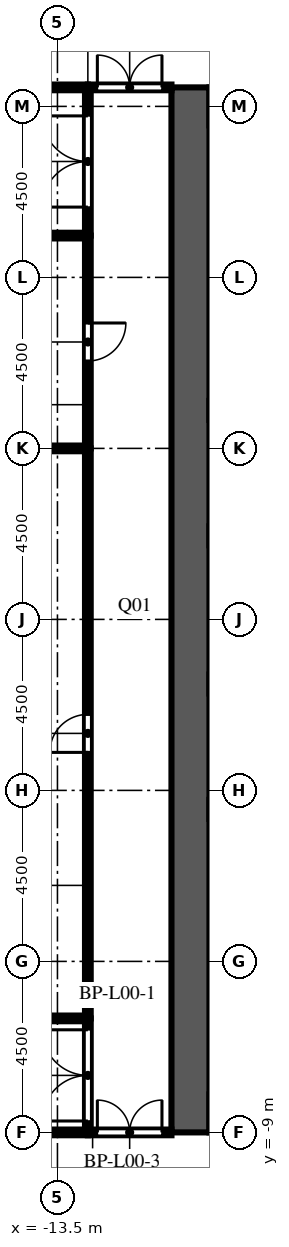
"""IFC4 building model, lengths in metres.
Left out: names, types, materials, properties, quantities, classifications, styles, units other than length and angle.
Written with IfcOpenShell. Run it as: python <this file> out.ifc"""

import sys

from ifc_helpers import new_model, si_unit, direction, frame, frame_2d, origin, place, context, subcontext, project, spatial, rectangle, extrude, element, fill, save


model = new_model("IFC4")
c1 = context("Model", 3, precision=1e-05, world=origin(), true_north=direction((0.0, 1.0)))
c2 = subcontext(c1, "Body", "Model", "MODEL_VIEW")
j1 = project(units=[si_unit("LENGTHUNIT", "METRE"), si_unit("PLANEANGLEUNIT", "RADIAN")], contexts=[c1])
p1 = place(None, origin())
s1 = spatial("IfcSite", under=j1, at=p1, CompositionType="ELEMENT")
p2 = place(p1, origin())
s2 = spatial("IfcBuilding", under=s1, at=p2, CompositionType="ELEMENT")
p3 = place(p2, origin())
s3 = spatial("IfcBuildingStorey", under=s2, at=p3, CompositionType="ELEMENT", Elevation=0.0)
p4 = place(p3, frame((-10.0, -9.0, 0.0), z_axis=(0.0, 0.0, 1.0), x_axis=(0.0, 1.0, 0.0)))
e1 = element("IfcWall", 1, at=p4, inside=s3, PredefinedType="SHEAR", context=c2, shape_type="SweptSolid", body=[
    extrude(rectangle(XDim=27.5, YDim=1.0, at=frame_2d((13.75, 0.0))), origin(), (0.0, 0.0, 1.0), 7.2),
])
p5 = place(p4, frame((12.55, 0.0, 0.0)))
e2 = element("IfcOpeningElement", 2, at=p5, cuts=e1, PredefinedType="OPENING", context=c2, shape_type="SweptSolid", body=[
    extrude(rectangle(XDim=2.4, YDim=2.4, at=frame_2d((1.2, 1.2))), frame((0.0, 0.51, 0.0), z_axis=(0.0, -1.0, 0.0), x_axis=(1.0, 0.0, 0.0)), (0.0, 0.0, 1.0), 1.02),
])
p6 = place(p4, frame((6.825, 0.0, 0.0)))
e3 = element("IfcOpeningElement", 3, at=p6, cuts=e1, PredefinedType="OPENING", context=c2, shape_type="SweptSolid", body=[
    extrude(rectangle(XDim=1.2, YDim=2.1, at=frame_2d((0.6, 1.05))), frame((0.0, 0.51, 0.0), z_axis=(0.0, -1.0, 0.0), x_axis=(1.0, 0.0, 0.0)), (0.0, 0.0, 1.0), 1.02),
])
p7 = place(p4, frame((19.475, 0.0, 0.0)))
e4 = element("IfcOpeningElement", 4, at=p7, cuts=e1, PredefinedType="OPENING", context=c2, shape_type="SweptSolid", body=[
    extrude(rectangle(XDim=1.2, YDim=2.1, at=frame_2d((0.6, 1.05))), frame((0.0, 0.51, 0.0), z_axis=(0.0, -1.0, 0.0), x_axis=(1.0, 0.0, 0.0)), (0.0, 0.0, 1.0), 1.02),
])
p8 = place(p3, frame((-12.7, -9.0, 0.0), z_axis=(0.0, 0.0, 1.0), x_axis=(1.0, 0.0, 0.0)))
e5 = element("IfcWall", 5, at=p8, inside=s3, PredefinedType="PARTITIONING", context=c2, shape_type="SweptSolid", body=[
    extrude(rectangle(XDim=2.2, YDim=0.15, at=frame_2d((1.1, 0.0))), origin(), (0.0, 0.0, 1.0), 6.75),
])
p9 = place(p8, frame((0.25, 0.0, 0.0)))
e6 = element("IfcOpeningElement", 6, at=p9, cuts=e5, PredefinedType="OPENING", context=c2, shape_type="SweptSolid", body=[
    extrude(rectangle(XDim=1.7, YDim=2.1, at=frame_2d((0.85, 1.05))), frame((0.0, 0.085, 0.0), z_axis=(0.0, -1.0, 0.0), x_axis=(1.0, 0.0, 0.0)), (0.0, 0.0, 1.0), 0.17),
])
p10 = place(p3, frame((-17.15, -9.0, 0.0), z_axis=(0.0, 0.0, 1.0), x_axis=(1.0, 0.0, 0.0)))
e7 = element("IfcWall", 7, at=p10, inside=s3, PredefinedType="PARTITIONING", context=c2, shape_type="SweptSolid", body=[
    extrude(rectangle(XDim=4.45, YDim=0.15, at=frame_2d((2.225, 0.0))), origin(), (0.0, 0.0, 1.0), 6.75),
])
p11 = place(p3, frame((-12.7, -9.0, 0.0), z_axis=(0.0, 0.0, 1.0), x_axis=(0.0, 1.0, 0.0)))
e8 = element("IfcWall", 8, at=p11, inside=s3, PredefinedType="PARTITIONING", context=c2, shape_type="SweptSolid", body=[
    extrude(rectangle(XDim=3.0, YDim=0.15, at=frame_2d((1.5, 0.0))), origin(), (0.0, 0.0, 1.0), 6.75),
])
p12 = place(p11, frame((0.3, 0.0, 0.0)))
e9 = element("IfcOpeningElement", 9, at=p12, cuts=e8, PredefinedType="OPENING", context=c2, shape_type="SweptSolid", body=[
    extrude(rectangle(XDim=2.4, YDim=2.4, at=frame_2d((1.2, 1.2))), frame((0.0, 0.085, 0.0), z_axis=(0.0, -1.0, 0.0), x_axis=(1.0, 0.0, 0.0)), (0.0, 0.0, 1.0), 0.17),
])
p13 = place(p3, frame((-12.7, -6.0, 0.0), z_axis=(0.0, 0.0, 1.0), x_axis=(0.0, 1.0, 0.0)))
e10 = element("IfcWall", 10, at=p13, inside=s3, PredefinedType="PARTITIONING", context=c2, shape_type="SweptSolid", body=[
    extrude(rectangle(XDim=15.0, YDim=0.15, at=frame_2d((7.5, 0.0))), origin(), (0.0, 0.0, 1.0), 6.75),
])
p14 = place(p13, frame((7.0, 0.0, 0.0)))
e11 = element("IfcOpeningElement", 11, at=p14, cuts=e10, PredefinedType="OPENING", context=c2, shape_type="SweptSolid", body=[
    extrude(rectangle(XDim=1.0, YDim=2.1, at=frame_2d((0.5, 1.05))), frame((0.0, 0.085, 0.0), z_axis=(0.0, -1.0, 0.0), x_axis=(1.0, 0.0, 0.0)), (0.0, 0.0, 1.0), 0.17),
])
p15 = place(p3, frame((-12.7, 9.0, 0.0), z_axis=(0.0, 0.0, 1.0), x_axis=(0.0, 1.0, 0.0)))
e12 = element("IfcWall", 12, at=p15, inside=s3, PredefinedType="PARTITIONING", context=c2, shape_type="SweptSolid", body=[
    extrude(rectangle(XDim=5.6, YDim=0.15, at=frame_2d((2.8, 0.0))), origin(), (0.0, 0.0, 1.0), 6.75),
])
p16 = place(p15, frame((2.3, 0.0, 0.0)))
e13 = element("IfcOpeningElement", 13, at=p16, cuts=e12, PredefinedType="OPENING", context=c2, shape_type="SweptSolid", body=[
    extrude(rectangle(XDim=1.0, YDim=2.1, at=frame_2d((0.5, 1.05))), frame((0.0, 0.085, 0.0), z_axis=(0.0, -1.0, 0.0), x_axis=(1.0, 0.0, 0.0)), (0.0, 0.0, 1.0), 0.17),
])
p17 = place(p3, frame((-12.7, 14.6, 0.0), z_axis=(0.0, 0.0, 1.0), x_axis=(0.0, 1.0, 0.0)))
e14 = element("IfcWall", 14, at=p17, inside=s3, PredefinedType="PARTITIONING", context=c2, shape_type="SweptSolid", body=[
    extrude(rectangle(XDim=3.9, YDim=0.15, at=frame_2d((1.95, 0.0))), origin(), (0.0, 0.0, 1.0), 6.75),
])
p18 = place(p17, frame((0.75, 0.0, 0.0)))
e15 = element("IfcOpeningElement", 15, at=p18, cuts=e14, PredefinedType="OPENING", context=c2, shape_type="SweptSolid", body=[
    extrude(rectangle(XDim=2.4, YDim=2.4, at=frame_2d((1.2, 1.2))), frame((0.0, 0.085, 0.0), z_axis=(0.0, -1.0, 0.0), x_axis=(1.0, 0.0, 0.0)), (0.0, 0.0, 1.0), 0.17),
])
p19 = place(p3, frame((-12.7, 18.5, 0.0), z_axis=(0.0, 0.0, 1.0), x_axis=(1.0, 0.0, 0.0)))
e16 = element("IfcWall", 16, at=p19, inside=s3, PredefinedType="PARTITIONING", context=c2, shape_type="SweptSolid", body=[
    extrude(rectangle(XDim=2.2, YDim=0.15, at=frame_2d((1.1, 0.0))), origin(), (0.0, 0.0, 1.0), 6.75),
])
p20 = place(p19, frame((0.25, 0.0, 0.0)))
e17 = element("IfcOpeningElement", 17, at=p20, cuts=e16, PredefinedType="OPENING", context=c2, shape_type="SweptSolid", body=[
    extrude(rectangle(XDim=1.7, YDim=2.1, at=frame_2d((0.85, 1.05))), frame((0.0, 0.085, 0.0), z_axis=(0.0, -1.0, 0.0), x_axis=(1.0, 0.0, 0.0)), (0.0, 0.0, 1.0), 0.17),
])
p21 = place(p3, frame((-31.325, -6.0, 0.0), z_axis=(0.0, 0.0, 1.0), x_axis=(1.0, 0.0, 0.0)))
e18 = element("IfcWall", 18, at=p21, inside=s3, PredefinedType="PARTITIONING", context=c2, shape_type="SweptSolid", body=[
    extrude(rectangle(XDim=18.625, YDim=0.15, at=frame_2d((9.312, 0.0))), origin(), (0.0, 0.0, 1.0), 6.75),
])
p22 = place(p3, frame((-17.15, 9.0, 0.0), z_axis=(0.0, 0.0, 1.0), x_axis=(1.0, 0.0, 0.0)))
e19 = element("IfcWall", 19, at=p22, inside=s3, PredefinedType="PARTITIONING", context=c2, shape_type="SweptSolid", body=[
    extrude(rectangle(XDim=4.45, YDim=0.15, at=frame_2d((2.225, 0.0))), origin(), (0.0, 0.0, 1.0), 6.75),
])
p23 = place(p3, frame((-31.325, 14.6, 0.0), z_axis=(0.0, 0.0, 1.0), x_axis=(1.0, 0.0, 0.0)))
e20 = element("IfcWall", 20, at=p23, inside=s3, PredefinedType="PARTITIONING", context=c2, shape_type="SweptSolid", body=[
    extrude(rectangle(XDim=18.625, YDim=0.15, at=frame_2d((9.312, 0.0))), origin(), (0.0, 0.0, 1.0), 6.75),
])
p24 = place(p3, frame((-17.15, 18.5, 0.0), z_axis=(0.0, 0.0, 1.0), x_axis=(1.0, 0.0, 0.0)))
e21 = element("IfcWall", 21, at=p24, inside=s3, PredefinedType="PARTITIONING", context=c2, shape_type="SweptSolid", body=[
    extrude(rectangle(XDim=4.45, YDim=0.15, at=frame_2d((2.225, 0.0))), origin(), (0.0, 0.0, 1.0), 6.75),
])
p25 = place(p5, origin())
e22 = element("IfcDoor", 22, at=p25, inside=s3, OperationType="DOUBLE_DOOR_DOUBLE_SWING", PredefinedType="DOOR", context=c2, shape_type="SweptSolid", body=[
    extrude(rectangle(XDim=2.4, YDim=2.4, at=frame_2d((1.2, 1.2))), frame((0.0, 0.025, 0.0), z_axis=(0.0, -1.0, 0.0), x_axis=(1.0, 0.0, 0.0)), (0.0, 0.0, 1.0), 0.05),
])
fill(e2, e22)
p26 = place(p6, origin())
e23 = element("IfcDoor", 23, at=p26, inside=s3, OperationType="SINGLE_SWING_LEFT", PredefinedType="DOOR", context=c2, shape_type="SweptSolid", body=[
    extrude(rectangle(XDim=1.2, YDim=2.1, at=frame_2d((0.6, 1.05))), frame((0.0, 0.025, 0.0), z_axis=(0.0, -1.0, 0.0), x_axis=(1.0, 0.0, 0.0)), (0.0, 0.0, 1.0), 0.05),
])
fill(e3, e23)
p27 = place(p7, origin())
e24 = element("IfcDoor", 24, at=p27, inside=s3, OperationType="SINGLE_SWING_LEFT", PredefinedType="DOOR", context=c2, shape_type="SweptSolid", body=[
    extrude(rectangle(XDim=1.2, YDim=2.1, at=frame_2d((0.6, 1.05))), frame((0.0, 0.025, 0.0), z_axis=(0.0, -1.0, 0.0), x_axis=(1.0, 0.0, 0.0)), (0.0, 0.0, 1.0), 0.05),
])
fill(e4, e24)
p28 = place(p14, origin())
e25 = element("IfcDoor", 25, at=p28, inside=s3, OperationType="SINGLE_SWING_LEFT", PredefinedType="DOOR", context=c2, shape_type="SweptSolid", body=[
    extrude(rectangle(XDim=1.0, YDim=2.1, at=frame_2d((0.5, 1.05))), frame((0.0, 0.025, 0.0), z_axis=(0.0, -1.0, 0.0), x_axis=(1.0, 0.0, 0.0)), (0.0, 0.0, 1.0), 0.05),
])
fill(e11, e25)
p29 = place(p16, origin())
e26 = element("IfcDoor", 26, at=p29, inside=s3, OperationType="SINGLE_SWING_RIGHT", PredefinedType="DOOR", context=c2, shape_type="SweptSolid", body=[
    extrude(rectangle(XDim=1.0, YDim=2.1, at=frame_2d((0.5, 1.05))), frame((0.0, 0.025, 0.0), z_axis=(0.0, -1.0, 0.0), x_axis=(1.0, 0.0, 0.0)), (0.0, 0.0, 1.0), 0.05),
])
fill(e13, e26)
p30 = place(p9, origin())
e27 = element("IfcDoor", 27, at=p30, inside=s3, OperationType="DOUBLE_DOOR_DOUBLE_SWING", PredefinedType="DOOR", context=c2, shape_type="SweptSolid", body=[
    extrude(rectangle(XDim=1.7, YDim=2.1, at=frame_2d((0.85, 1.05))), frame((0.0, 0.025, 0.0), z_axis=(0.0, -1.0, 0.0), x_axis=(1.0, 0.0, 0.0)), (0.0, 0.0, 1.0), 0.05),
])
fill(e6, e27)
p31 = place(p12, origin())
e28 = element("IfcDoor", 28, at=p31, inside=s3, OperationType="DOUBLE_DOOR_DOUBLE_SWING", PredefinedType="DOOR", context=c2, shape_type="SweptSolid", body=[
    extrude(rectangle(XDim=2.4, YDim=2.4, at=frame_2d((1.2, 1.2))), frame((0.0, 0.025, 0.0), z_axis=(0.0, -1.0, 0.0), x_axis=(1.0, 0.0, 0.0)), (0.0, 0.0, 1.0), 0.05),
])
fill(e9, e28)
p32 = place(p18, origin())
e29 = element("IfcDoor", 29, at=p32, inside=s3, OperationType="DOUBLE_DOOR_DOUBLE_SWING", PredefinedType="DOOR", context=c2, shape_type="SweptSolid", body=[
    extrude(rectangle(XDim=2.4, YDim=2.4, at=frame_2d((1.2, 1.2))), frame((0.0, 0.025, 0.0), z_axis=(0.0, -1.0, 0.0), x_axis=(1.0, 0.0, 0.0)), (0.0, 0.0, 1.0), 0.05),
])
fill(e15, e29)
p33 = place(p20, origin())
e30 = element("IfcDoor", 30, at=p33, inside=s3, OperationType="DOUBLE_DOOR_DOUBLE_SWING", PredefinedType="DOOR", context=c2, shape_type="SweptSolid", body=[
    extrude(rectangle(XDim=1.7, YDim=2.1, at=frame_2d((0.85, 1.05))), frame((0.0, 0.025, 0.0), z_axis=(0.0, -1.0, 0.0), x_axis=(1.0, 0.0, 0.0)), (0.0, 0.0, 1.0), 0.05),
])
fill(e17, e30)
save(model, sys.argv[1])
